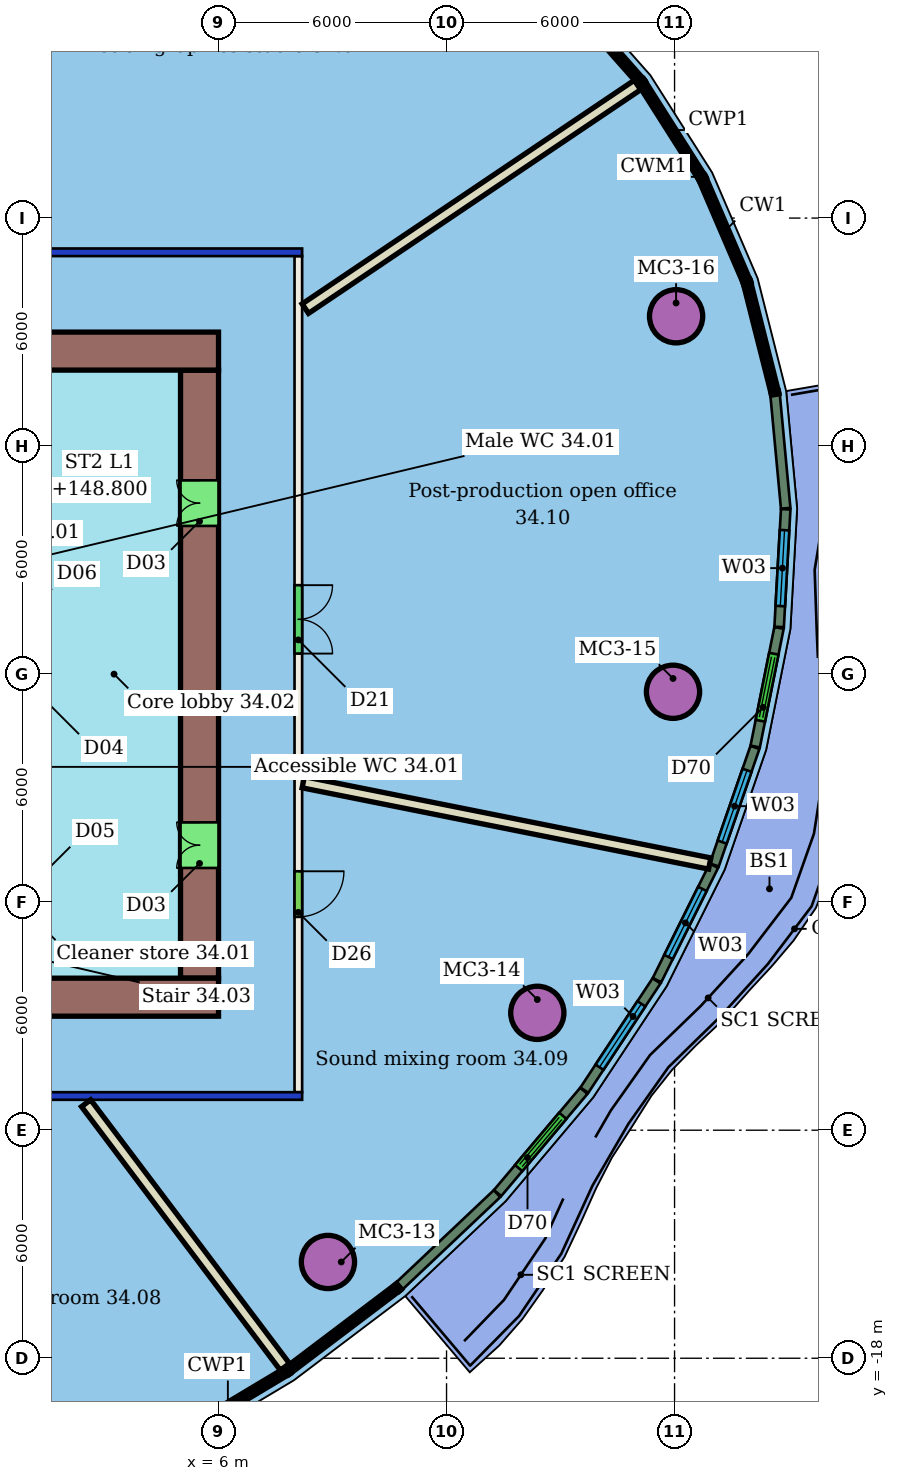
"""IFC4 building model, lengths in metres.
Left out: names, types, materials, properties, quantities, classifications, styles, units other than length and angle.
Written with IfcOpenShell. Run it as: python <this file> out.ifc"""

import sys

from ifc_helpers import new_model, si_unit, direction, frame, frame_2d, origin, origin_2d, place, context, subcontext, project, spatial, rectangle, hollow_circle, extrude, element, fill, save


model = new_model("IFC4")
c1 = context("Model", 3, precision=1e-05, world=origin(), true_north=direction((0.0, 1.0)))
c2 = subcontext(c1, "Body", "Model", "MODEL_VIEW")
j1 = project(units=[si_unit("LENGTHUNIT", "METRE"), si_unit("PLANEANGLEUNIT", "RADIAN")], contexts=[c1])
p1 = place(None, origin())
s1 = spatial("IfcSite", under=j1, at=p1, CompositionType="ELEMENT")
p2 = place(p1, origin())
s2 = spatial("IfcBuilding", under=s1, at=p2, CompositionType="ELEMENT")
p3 = place(p2, frame((0.0, 0.0, 147.0)))
s3 = spatial("IfcBuildingStorey", under=s2, at=p3, CompositionType="ELEMENT", Elevation=147.0)
for number, where, z_axis, x_axis in (
    (1, (8.879, -15.467, 0.0), (0.0, 0.0, 1.0), (1.0, 0.0, 0.0)),
    (2, (14.388, -8.912, 0.0), (0.0, 0.0, 1.0), (1.0, 0.0, 0.0)),
    (3, (17.959, -0.464, 0.0), (0.0, 0.0, 1.0), (1.0, 0.0, 0.0)),
    (4, (18.041, 9.417, 0.0), (0.0, 0.0, 1.0), (1.0, 0.0, 0.0)),
):
    element("IfcColumn", number, at=place(p3, frame(where, z_axis=z_axis, x_axis=x_axis)), inside=s3, PredefinedType="COLUMN", context=c2, shape_type="SweptSolid", body=[
        extrude(hollow_circle(Radius=0.7, WallThickness=0.05, at=origin_2d()), origin(), (0.0, 0.0, 1.0), 3.45),
    ])
p4 = place(p3, frame((8.2, -11.1, 0.0), z_axis=(0.0, 0.0, 1.0), x_axis=(-1.0, 0.0, 0.0)))
e5 = element("IfcWall", 5, at=p4, inside=s3, PredefinedType="PARTITIONING", context=c2, shape_type="SweptSolid", body=[
    extrude(rectangle(XDim=28.4, YDim=0.2, at=frame_2d((14.2, 0.0))), origin(), (0.0, 0.0, 1.0), 3.05),
])
p5 = place(p4, frame((22.679, 0.0, 0.0)))
e6 = element("IfcOpeningElement", 6, at=p5, cuts=e5, PredefinedType="OPENING", context=c2, shape_type="SweptSolid", body=[
    extrude(rectangle(XDim=1.8, YDim=2.1, at=frame_2d((0.9, 1.05))), frame((0.0, 0.11, 0.0), z_axis=(0.0, -1.0, 0.0), x_axis=(1.0, 0.0, 0.0)), (0.0, 0.0, 1.0), 0.22),
])
p6 = place(p4, frame((17.359, 0.0, 0.0)))
e7 = element("IfcOpeningElement", 7, at=p6, cuts=e5, PredefinedType="OPENING", context=c2, shape_type="SweptSolid", body=[
    extrude(rectangle(XDim=0.9, YDim=2.1, at=frame_2d((0.45, 1.05))), frame((0.0, 0.11, 0.0), z_axis=(0.0, -1.0, 0.0), x_axis=(1.0, 0.0, 0.0)), (0.0, 0.0, 1.0), 0.22),
])
p7 = place(p4, frame((7.557, 0.0, 0.0)))
e8 = element("IfcOpeningElement", 8, at=p7, cuts=e5, PredefinedType="OPENING", context=c2, shape_type="SweptSolid", body=[
    extrude(rectangle(XDim=1.2, YDim=2.1, at=frame_2d((0.6, 1.05))), frame((0.0, 0.11, 0.0), z_axis=(0.0, -1.0, 0.0), x_axis=(1.0, 0.0, 0.0)), (0.0, 0.0, 1.0), 0.22),
])
p8 = place(p3, frame((-20.2, 11.1, 0.0), z_axis=(0.0, 0.0, 1.0), x_axis=(1.0, 0.0, 0.0)))
e9 = element("IfcWall", 9, at=p8, inside=s3, PredefinedType="PARTITIONING", context=c2, shape_type="SweptSolid", body=[
    extrude(rectangle(XDim=28.4, YDim=0.2, at=frame_2d((14.2, 0.0))), origin(), (0.0, 0.0, 1.0), 3.05),
])
p9 = place(p8, frame((20.499, 0.0, 0.0)))
e10 = element("IfcOpeningElement", 10, at=p9, cuts=e9, PredefinedType="OPENING", context=c2, shape_type="SweptSolid", body=[
    extrude(rectangle(XDim=1.1, YDim=2.1, at=frame_2d((0.55, 1.05))), frame((0.0, 0.11, 0.0), z_axis=(0.0, -1.0, 0.0), x_axis=(1.0, 0.0, 0.0)), (0.0, 0.0, 1.0), 0.22),
])
p10 = place(p8, frame((10.889, 0.0, 0.0)))
e11 = element("IfcOpeningElement", 11, at=p10, cuts=e9, PredefinedType="OPENING", context=c2, shape_type="SweptSolid", body=[
    extrude(rectangle(XDim=1.0, YDim=2.1, at=frame_2d((0.5, 1.05))), frame((0.0, 0.11, 0.0), z_axis=(0.0, -1.0, 0.0), x_axis=(1.0, 0.0, 0.0)), (0.0, 0.0, 1.0), 0.22),
])
p11 = place(p8, frame((4.76, 0.0, 0.0)))
e12 = element("IfcOpeningElement", 12, at=p11, cuts=e9, PredefinedType="OPENING", context=c2, shape_type="SweptSolid", body=[
    extrude(rectangle(XDim=1.2, YDim=2.1, at=frame_2d((0.6, 1.05))), frame((0.0, 0.11, 0.0), z_axis=(0.0, -1.0, 0.0), x_axis=(1.0, 0.0, 0.0)), (0.0, 0.0, 1.0), 0.22),
])
p12 = place(p3, frame((8.1, 11.0, 0.0), z_axis=(0.0, 0.0, 1.0), x_axis=(0.0, -1.0, 0.0)))
e13 = element("IfcWall", 13, at=p12, inside=s3, PredefinedType="PARTITIONING", context=c2, shape_type="SweptSolid", body=[
    extrude(rectangle(XDim=22.0, YDim=0.2, at=frame_2d((11.0, 0.0))), origin(), (0.0, 0.0, 1.0), 3.45),
])
p13 = place(p12, frame((16.187, 0.0, 0.0)))
e14 = element("IfcOpeningElement", 14, at=p13, cuts=e13, PredefinedType="OPENING", context=c2, shape_type="SweptSolid", body=[
    extrude(rectangle(XDim=1.2, YDim=2.1, at=frame_2d((0.6, 1.05))), frame((0.0, 0.11, 0.0), z_axis=(0.0, -1.0, 0.0), x_axis=(1.0, 0.0, 0.0)), (0.0, 0.0, 1.0), 0.22),
])
p14 = place(p12, frame((8.659, 0.0, 0.0)))
e15 = element("IfcOpeningElement", 15, at=p14, cuts=e13, PredefinedType="OPENING", context=c2, shape_type="SweptSolid", body=[
    extrude(rectangle(XDim=1.8, YDim=2.1, at=frame_2d((0.9, 1.05))), frame((0.0, 0.11, 0.0), z_axis=(0.0, -1.0, 0.0), x_axis=(1.0, 0.0, 0.0)), (0.0, 0.0, 1.0), 0.22),
])
p15 = place(p3, frame((17.024, 15.502, 0.0), z_axis=(0.0, 0.0, 1.0), x_axis=(-0.82951075197, -0.558490745104, 0.0)))
e16 = element("IfcWall", 16, at=p15, inside=s3, PredefinedType="PARTITIONING", context=c2, shape_type="SweptSolid", body=[
    extrude(rectangle(XDim=10.537, YDim=0.3, at=frame_2d((5.269, 0.0))), origin(), (0.0, 0.0, 1.0), 3.45),
])
p16 = place(p3, frame((7.746, -18.227, 0.0), z_axis=(0.0, 0.0, 1.0), x_axis=(-0.602106567293, 0.798415732324, 0.0)))
e17 = element("IfcWall", 17, at=p16, inside=s3, PredefinedType="PARTITIONING", context=c2, shape_type="SweptSolid", body=[
    extrude(rectangle(XDim=8.688, YDim=0.3, at=frame_2d((4.344, 0.0))), origin(), (0.0, 0.0, 1.0), 3.45),
])
p17 = place(p3, frame((18.925, -4.983, 0.0), z_axis=(0.0, 0.0, 1.0), x_axis=(-0.980597889581, 0.196030046039, 0.0)))
e18 = element("IfcWall", 18, at=p17, inside=s3, PredefinedType="PARTITIONING", context=c2, shape_type="SweptSolid", body=[
    extrude(rectangle(XDim=10.907, YDim=0.3, at=frame_2d((5.454, 0.0))), origin(), (0.0, 0.0, 1.0), 3.45),
])
p18 = place(p3, frame((10.76, -16.097, 0.0), z_axis=(0.0, 0.0, 1.0), x_axis=(0.72679086529, 0.68685881965, 0.0)))
e19 = element("IfcWall", 19, at=p18, inside=s3, PredefinedType="SOLIDWALL", context=c2, shape_type="SweptSolid", body=[
    extrude(rectangle(XDim=3.534, YDim=0.25, at=frame_2d((1.767, 0.0))), origin(), (0.0, 0.0, 1.0), 3.1),
])
p19 = place(p3, frame((13.344, -13.653, 0.0), z_axis=(0.0, 0.0, 1.0), x_axis=(0.644846877048, 0.764311785308, 0.0)))
e20 = element("IfcWall", 20, at=p19, inside=s3, PredefinedType="SOLIDWALL", context=c2, shape_type="SweptSolid", body=[
    extrude(rectangle(XDim=3.519, YDim=0.25, at=frame_2d((1.76, 0.0))), origin(), (0.0, 0.0, 1.0), 3.1),
])
p20 = place(p19, frame((0.86, 0.0, 0.0)))
e21 = element("IfcOpeningElement", 21, at=p20, cuts=e20, PredefinedType="OPENING", context=c2, shape_type="SweptSolid", body=[
    extrude(rectangle(XDim=1.8, YDim=2.4, at=frame_2d((0.9, 1.2))), frame((0.0, 0.135, 0.0), z_axis=(0.0, -1.0, 0.0), x_axis=(1.0, 0.0, 0.0)), (0.0, 0.0, 1.0), 0.27),
])
p21 = place(p3, frame((15.626, -10.946, 0.0), z_axis=(0.0, 0.0, 1.0), x_axis=(0.551326854006, 0.834289338331, 0.0)))
e22 = element("IfcWall", 22, at=p21, inside=s3, PredefinedType="SOLIDWALL", context=c2, shape_type="SweptSolid", body=[
    extrude(rectangle(XDim=3.445, YDim=0.25, at=frame_2d((1.723, 0.0))), origin(), (0.0, 0.0, 1.0), 3.1),
])
p22 = place(p21, frame((0.723, 0.0, 0.9)))
e23 = element("IfcOpeningElement", 23, at=p22, cuts=e22, PredefinedType="OPENING", context=c2, shape_type="SweptSolid", body=[
    extrude(rectangle(XDim=2.0, YDim=2.1, at=frame_2d((1.0, 1.05))), frame((0.0, 0.135, 0.0), z_axis=(0.0, -1.0, 0.0), x_axis=(1.0, 0.0, 0.0)), (0.0, 0.0, 1.0), 0.27),
])
p23 = place(p3, frame((17.538, -8.051, 0.0), z_axis=(0.0, 0.0, 1.0), x_axis=(0.445527727944, 0.895268140633, 0.0)))
e24 = element("IfcWall", 24, at=p23, inside=s3, PredefinedType="SOLIDWALL", context=c2, shape_type="SweptSolid", body=[
    extrude(rectangle(XDim=3.361, YDim=0.25, at=frame_2d((1.681, 0.0))), origin(), (0.0, 0.0, 1.0), 3.1),
])
p24 = place(p23, frame((0.681, 0.0, 0.9)))
e25 = element("IfcOpeningElement", 25, at=p24, cuts=e24, PredefinedType="OPENING", context=c2, shape_type="SweptSolid", body=[
    extrude(rectangle(XDim=2.0, YDim=2.1, at=frame_2d((1.0, 1.05))), frame((0.0, 0.135, 0.0), z_axis=(0.0, -1.0, 0.0), x_axis=(1.0, 0.0, 0.0)), (0.0, 0.0, 1.0), 0.27),
])
p25 = place(p3, frame((19.044, -5.02, 0.0), z_axis=(0.0, 0.0, 1.0), x_axis=(0.327287400889, 0.944924842101, 0.0)))
e26 = element("IfcWall", 26, at=p25, inside=s3, PredefinedType="SOLIDWALL", context=c2, shape_type="SweptSolid", body=[
    extrude(rectangle(XDim=3.272, YDim=0.25, at=frame_2d((1.636, 0.0))), origin(), (0.0, 0.0, 1.0), 3.1),
])
p26 = place(p25, frame((0.636, 0.0, 0.9)))
e27 = element("IfcOpeningElement", 27, at=p26, cuts=e26, PredefinedType="OPENING", context=c2, shape_type="SweptSolid", body=[
    extrude(rectangle(XDim=2.0, YDim=2.1, at=frame_2d((1.0, 1.05))), frame((0.0, 0.135, 0.0), z_axis=(0.0, -1.0, 0.0), x_axis=(1.0, 0.0, 0.0)), (0.0, 0.0, 1.0), 0.27),
])
p27 = place(p3, frame((20.122, -1.904, 0.0), z_axis=(0.0, 0.0, 1.0), x_axis=(0.196824126918, 0.980438811483, 0.0)))
e28 = element("IfcWall", 28, at=p27, inside=s3, PredefinedType="SOLIDWALL", context=c2, shape_type="SweptSolid", body=[
    extrude(rectangle(XDim=3.183, YDim=0.25, at=frame_2d((1.591, 0.0))), origin(), (0.0, 0.0, 1.0), 3.1),
])
p28 = place(p27, frame((0.691, 0.0, 0.0)))
e29 = element("IfcOpeningElement", 29, at=p28, cuts=e28, PredefinedType="OPENING", context=c2, shape_type="SweptSolid", body=[
    extrude(rectangle(XDim=1.8, YDim=2.4, at=frame_2d((0.9, 1.2))), frame((0.0, 0.135, 0.0), z_axis=(0.0, -1.0, 0.0), x_axis=(1.0, 0.0, 0.0)), (0.0, 0.0, 1.0), 0.27),
])
p29 = place(p3, frame((20.752, 1.242, 0.0), z_axis=(0.0, 0.0, 1.0), x_axis=(0.055823234229, 0.998440667501, 0.0)))
e30 = element("IfcWall", 30, at=p29, inside=s3, PredefinedType="SOLIDWALL", context=c2, shape_type="SweptSolid", body=[
    extrude(rectangle(XDim=3.101, YDim=0.25, at=frame_2d((1.55, 0.0))), origin(), (0.0, 0.0, 1.0), 3.1),
])
p30 = place(p29, frame((0.551, 0.0, 0.9)))
e31 = element("IfcOpeningElement", 31, at=p30, cuts=e30, PredefinedType="OPENING", context=c2, shape_type="SweptSolid", body=[
    extrude(rectangle(XDim=2.0, YDim=2.1, at=frame_2d((1.0, 1.05))), frame((0.0, 0.135, 0.0), z_axis=(0.0, -1.0, 0.0), x_axis=(1.0, 0.0, 0.0)), (0.0, 0.0, 1.0), 0.27),
])
p31 = place(p3, frame((20.924, 4.365, 0.0), z_axis=(0.0, 0.0, 1.0), x_axis=(-0.093052449372, 0.995661208276, 0.0)))
e32 = element("IfcWall", 32, at=p31, inside=s3, PredefinedType="SOLIDWALL", context=c2, shape_type="SweptSolid", body=[
    extrude(rectangle(XDim=2.991, YDim=0.25, at=frame_2d((1.496, 0.0))), origin(), (0.0, 0.0, 1.0), 3.1),
])
p32 = place(p3, frame((6.0, 8.5, 0.0), z_axis=(0.0, 0.0, 1.0), x_axis=(-1.0, 0.0, 0.0)))
e33 = element("IfcWall", 33, at=p32, inside=s3, PredefinedType="SHEAR", context=c2, shape_type="SweptSolid", body=[
    extrude(rectangle(XDim=12.0, YDim=1.0, at=frame_2d((6.0, 0.0))), origin(), (0.0, 0.0, 1.0), 3.3),
])
p33 = place(p32, frame((5.6, 0.0, 0.0)))
e34 = element("IfcOpeningElement", 34, at=p33, cuts=e33, PredefinedType="OPENING", context=c2, shape_type="SweptSolid", body=[
    extrude(rectangle(XDim=1.2, YDim=2.1, at=frame_2d((0.6, 1.05))), frame((0.0, 0.51, 0.0), z_axis=(0.0, -1.0, 0.0), x_axis=(1.0, 0.0, 0.0)), (0.0, 0.0, 1.0), 1.02),
])
p34 = place(p3, frame((-18.0, -8.5, 0.0), z_axis=(0.0, 0.0, 1.0), x_axis=(1.0, 0.0, 0.0)))
e35 = element("IfcWall", 35, at=p34, inside=s3, PredefinedType="SHEAR", context=c2, shape_type="SweptSolid", body=[
    extrude(rectangle(XDim=24.0, YDim=1.0, at=frame_2d((12.0, 0.0))), origin(), (0.0, 0.0, 1.0), 3.3),
])
p35 = place(p34, frame((6.0, 0.0, 0.0)))
e36 = element("IfcOpeningElement", 36, at=p35, cuts=e35, PredefinedType="OPENING", context=c2, shape_type="SweptSolid", body=[
    extrude(rectangle(XDim=1.2, YDim=2.1, at=frame_2d((0.6, 1.05))), frame((0.0, 0.51, 0.0), z_axis=(0.0, -1.0, 0.0), x_axis=(1.0, 0.0, 0.0)), (0.0, 0.0, 1.0), 1.02),
])
p36 = place(p3, frame((5.5, -8.0, 0.0), z_axis=(0.0, 0.0, 1.0), x_axis=(0.0, 1.0, 0.0)))
e37 = element("IfcWall", 37, at=p36, inside=s3, PredefinedType="SHEAR", context=c2, shape_type="SweptSolid", body=[
    extrude(rectangle(XDim=16.0, YDim=1.0, at=frame_2d((8.0, 0.0))), origin(), (0.0, 0.0, 1.0), 3.3),
])
p37 = place(p36, frame((2.9, 0.0, 0.0)))
e38 = element("IfcOpeningElement", 38, at=p37, cuts=e37, PredefinedType="OPENING", context=c2, shape_type="SweptSolid", body=[
    extrude(rectangle(XDim=1.2, YDim=2.1, at=frame_2d((0.6, 1.05))), frame((0.0, 0.51, 0.0), z_axis=(0.0, -1.0, 0.0), x_axis=(1.0, 0.0, 0.0)), (0.0, 0.0, 1.0), 1.02),
])
p38 = place(p36, frame((11.9, 0.0, 0.0)))
e39 = element("IfcOpeningElement", 39, at=p38, cuts=e37, PredefinedType="OPENING", context=c2, shape_type="SweptSolid", body=[
    extrude(rectangle(XDim=1.2, YDim=2.1, at=frame_2d((0.6, 1.05))), frame((0.0, 0.51, 0.0), z_axis=(0.0, -1.0, 0.0), x_axis=(1.0, 0.0, 0.0)), (0.0, 0.0, 1.0), 1.02),
])
p39 = place(p13, origin())
e40 = element("IfcDoor", 40, at=p39, inside=s3, OperationType="SINGLE_SWING_LEFT", PredefinedType="DOOR", context=c2, shape_type="SweptSolid", body=[
    extrude(rectangle(XDim=1.2, YDim=2.1, at=frame_2d((0.6, 1.05))), frame((0.0, 0.025, 0.0), z_axis=(0.0, -1.0, 0.0), x_axis=(1.0, 0.0, 0.0)), (0.0, 0.0, 1.0), 0.05),
])
fill(e14, e40)
p40 = place(p14, origin())
e41 = element("IfcDoor", 41, at=p40, inside=s3, OperationType="DOUBLE_DOOR_SINGLE_SWING", PredefinedType="DOOR", context=c2, shape_type="SweptSolid", body=[
    extrude(rectangle(XDim=1.8, YDim=2.1, at=frame_2d((0.9, 1.05))), frame((0.0, 0.025, 0.0), z_axis=(0.0, -1.0, 0.0), x_axis=(1.0, 0.0, 0.0)), (0.0, 0.0, 1.0), 0.05),
])
fill(e15, e41)
p41 = place(p20, origin())
e42 = element("IfcDoor", 42, at=p41, inside=s3, OperationType="DOUBLE_DOOR_SLIDING", PredefinedType="DOOR", context=c2, shape_type="SweptSolid", body=[
    extrude(rectangle(XDim=1.8, YDim=2.4, at=frame_2d((0.9, 1.2))), frame((0.0, 0.025, 0.0), z_axis=(0.0, -1.0, 0.0), x_axis=(1.0, 0.0, 0.0)), (0.0, 0.0, 1.0), 0.05),
])
fill(e21, e42)
p42 = place(p22, origin())
e43 = element("IfcWindow", 43, at=p42, inside=s3, PartitioningType="SINGLE_PANEL", PredefinedType="WINDOW", context=c2, shape_type="SweptSolid", body=[
    extrude(rectangle(XDim=2.0, YDim=2.1, at=frame_2d((1.0, 1.05))), frame((0.0, 0.03, 0.0), z_axis=(0.0, -1.0, 0.0), x_axis=(1.0, 0.0, 0.0)), (0.0, 0.0, 1.0), 0.06),
])
fill(e23, e43)
p43 = place(p24, origin())
e44 = element("IfcWindow", 44, at=p43, inside=s3, PartitioningType="SINGLE_PANEL", PredefinedType="WINDOW", context=c2, shape_type="SweptSolid", body=[
    extrude(rectangle(XDim=2.0, YDim=2.1, at=frame_2d((1.0, 1.05))), frame((0.0, 0.03, 0.0), z_axis=(0.0, -1.0, 0.0), x_axis=(1.0, 0.0, 0.0)), (0.0, 0.0, 1.0), 0.06),
])
fill(e25, e44)
p44 = place(p26, origin())
e45 = element("IfcWindow", 45, at=p44, inside=s3, PartitioningType="SINGLE_PANEL", PredefinedType="WINDOW", context=c2, shape_type="SweptSolid", body=[
    extrude(rectangle(XDim=2.0, YDim=2.1, at=frame_2d((1.0, 1.05))), frame((0.0, 0.03, 0.0), z_axis=(0.0, -1.0, 0.0), x_axis=(1.0, 0.0, 0.0)), (0.0, 0.0, 1.0), 0.06),
])
fill(e27, e45)
p45 = place(p28, origin())
e46 = element("IfcDoor", 46, at=p45, inside=s3, OperationType="DOUBLE_DOOR_SLIDING", PredefinedType="DOOR", context=c2, shape_type="SweptSolid", body=[
    extrude(rectangle(XDim=1.8, YDim=2.4, at=frame_2d((0.9, 1.2))), frame((0.0, 0.025, 0.0), z_axis=(0.0, -1.0, 0.0), x_axis=(1.0, 0.0, 0.0)), (0.0, 0.0, 1.0), 0.05),
])
fill(e29, e46)
p46 = place(p30, origin())
e47 = element("IfcWindow", 47, at=p46, inside=s3, PartitioningType="SINGLE_PANEL", PredefinedType="WINDOW", context=c2, shape_type="SweptSolid", body=[
    extrude(rectangle(XDim=2.0, YDim=2.1, at=frame_2d((1.0, 1.05))), frame((0.0, 0.03, 0.0), z_axis=(0.0, -1.0, 0.0), x_axis=(1.0, 0.0, 0.0)), (0.0, 0.0, 1.0), 0.06),
])
fill(e31, e47)
p47 = place(p37, origin())
e48 = element("IfcDoor", 48, at=p47, inside=s3, OperationType="DOUBLE_DOOR_SINGLE_SWING", PredefinedType="NOTDEFINED", context=c2, shape_type="SweptSolid", body=[
    extrude(rectangle(XDim=1.2, YDim=2.1, at=frame_2d((0.6, 1.05))), frame((0.0, 0.025, 0.0), z_axis=(0.0, -1.0, 0.0), x_axis=(1.0, 0.0, 0.0)), (0.0, 0.0, 1.0), 0.05),
])
fill(e38, e48)
p48 = place(p38, origin())
e49 = element("IfcDoor", 49, at=p48, inside=s3, OperationType="DOUBLE_DOOR_SINGLE_SWING", PredefinedType="NOTDEFINED", context=c2, shape_type="SweptSolid", body=[
    extrude(rectangle(XDim=1.2, YDim=2.1, at=frame_2d((0.6, 1.05))), frame((0.0, 0.025, 0.0), z_axis=(0.0, -1.0, 0.0), x_axis=(1.0, 0.0, 0.0)), (0.0, 0.0, 1.0), 0.05),
])
fill(e39, e49)
save(model, sys.argv[1])
